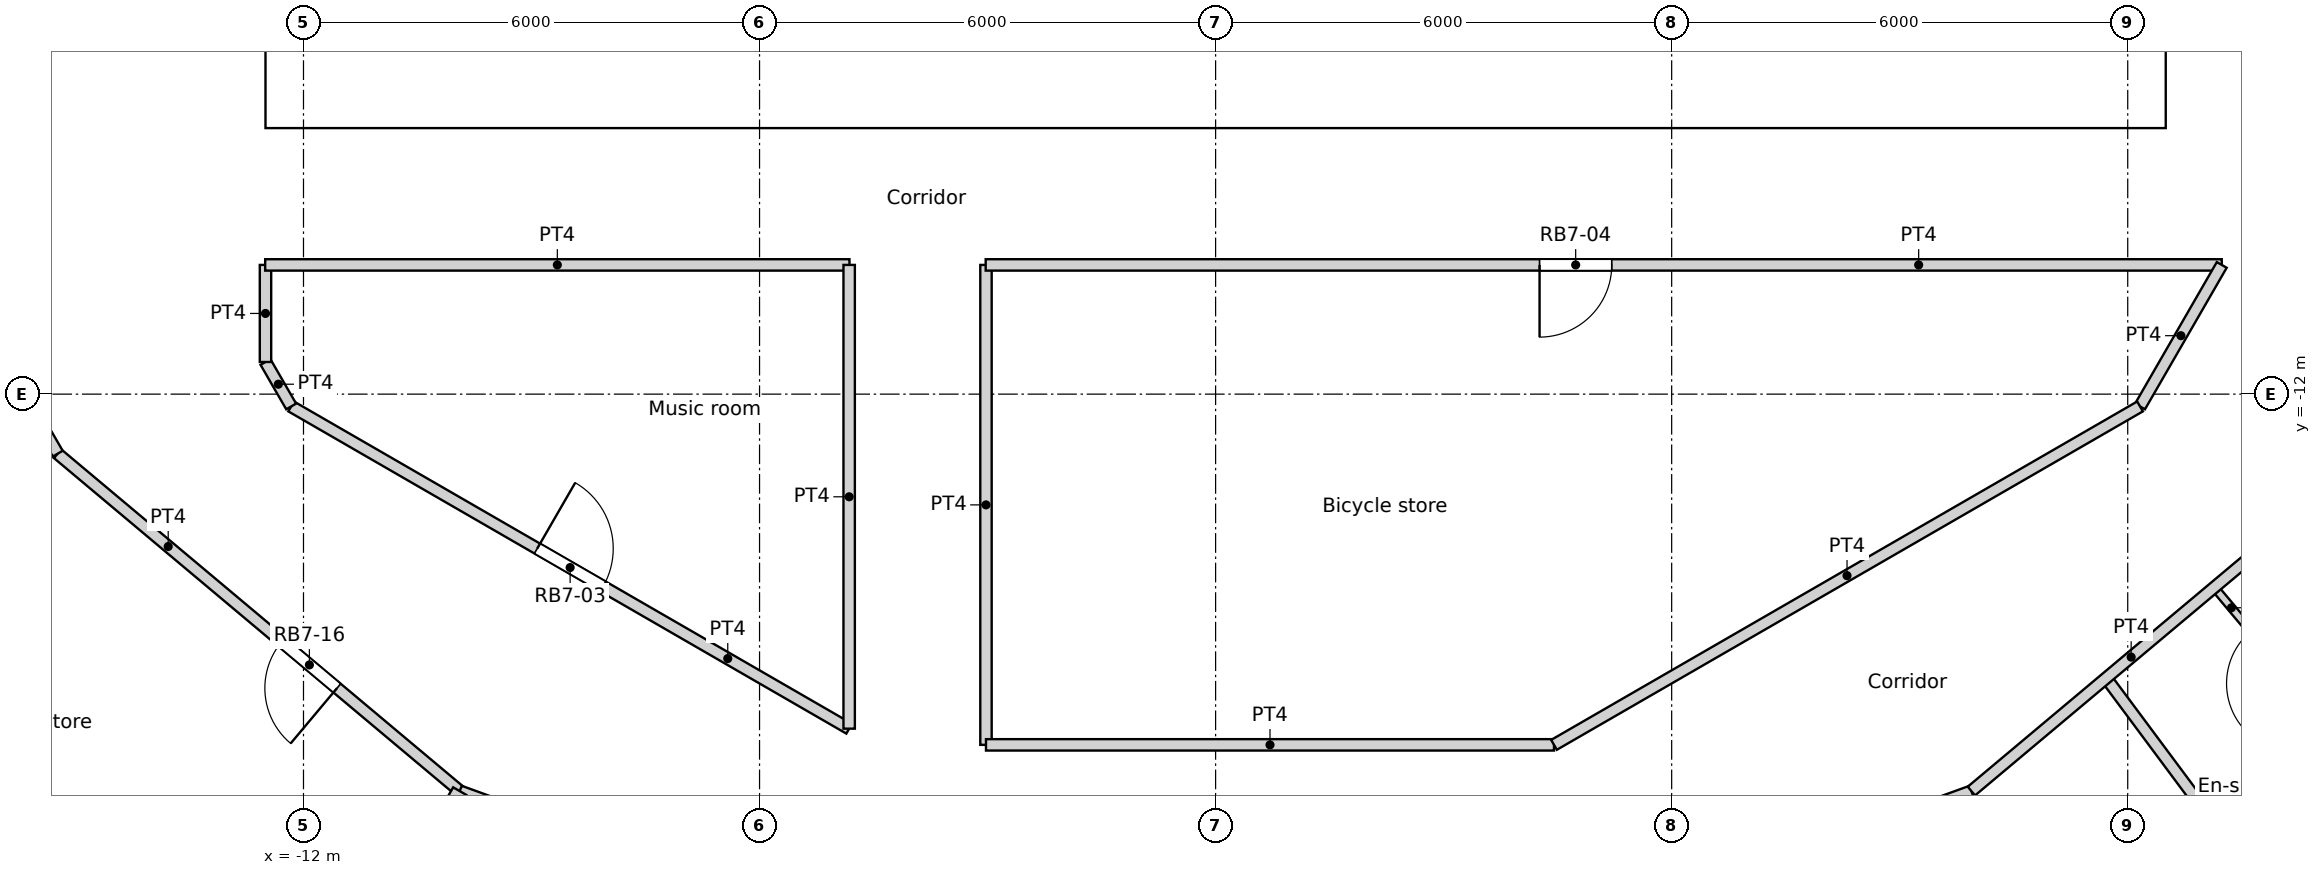
"""IFC4 building model, lengths in metres.
Left out: names, types, materials, properties, quantities, classifications, styles, units other than length and angle.
Written with IfcOpenShell. Run it as: python <this file> out.ifc"""

import sys

from ifc_helpers import new_model, si_unit, direction, frame, frame_2d, origin, origin_2d, place, context, subcontext, project, spatial, rectangle, circle, extrude, element, fill, save


model = new_model("IFC4")
c1 = context("Model", 3, precision=1e-05, world=origin(), true_north=direction((0.0, 1.0)))
c2 = subcontext(c1, "Body", "Model", "MODEL_VIEW")
j1 = project(units=[si_unit("LENGTHUNIT", "METRE"), si_unit("PLANEANGLEUNIT", "RADIAN")], contexts=[c1])
p1 = place(None, origin())
s1 = spatial("IfcSite", under=j1, at=p1, CompositionType="ELEMENT")
p2 = place(p1, origin())
s2 = spatial("IfcBuilding", under=s1, at=p2, CompositionType="ELEMENT")
p3 = place(p2, frame((0.0, 0.0, 190.8)))
s3 = spatial("IfcBuildingStorey", under=s2, at=p3, CompositionType="ELEMENT", Elevation=190.8)
for number, where, z_axis, x_axis in (
    (1, (-13.798, -12.802, 0.0), (0.0, 0.0, 1.0), (1.0, 0.0, 0.0)),
    (2, (-9.411, -16.301, 0.0), (0.0, 0.0, 1.0), (1.0, 0.0, 0.0)),
    (3, (6.876, -17.521, 0.0), (0.0, 0.0, 1.0), (1.0, 0.0, 0.0)),
    (4, (11.735, -14.716, 0.0), (0.0, 0.0, 1.0), (1.0, 0.0, 0.0)),
):
    element("IfcColumn", number, at=place(p3, frame(where, z_axis=z_axis, x_axis=x_axis)), inside=s3, PredefinedType="COLUMN", context=c2, shape_type="SweptSolid", body=[
        extrude(circle(Radius=0.65, at=origin_2d()), origin(), (0.0, 0.0, 1.0), 3.6),
    ])
p4 = place(p3, frame((-12.5, -8.05, 0.0), z_axis=(0.0, 0.0, 1.0), x_axis=(1.0, 0.0, 0.0)))
e5 = element("IfcWall", 5, at=p4, inside=s3, PredefinedType="SOLIDWALL", context=c2, shape_type="SweptSolid", body=[
    extrude(rectangle(XDim=25.0, YDim=0.9, at=frame_2d((12.5, 0.0))), origin(), (0.0, 0.0, 1.0), 3.6),
])
p5 = place(p4, frame((13.4, 0.0, 0.0)))
e6 = element("IfcOpeningElement", 6, at=p5, cuts=e5, PredefinedType="OPENING", context=c2, shape_type="SweptSolid", body=[
    extrude(rectangle(XDim=1.0, YDim=2.1, at=frame_2d((0.5, 1.05))), frame((0.0, 0.45, 0.0), z_axis=(0.0, -1.0, 0.0), x_axis=(1.0, 0.0, 0.0)), (0.0, 0.0, 1.0), 0.9),
])
p6 = place(p4, frame((8.3, 0.0, 0.0)))
e7 = element("IfcOpeningElement", 7, at=p6, cuts=e5, PredefinedType="OPENING", context=c2, shape_type="SweptSolid", body=[
    extrude(rectangle(XDim=1.8, YDim=2.1, at=frame_2d((0.9, 1.05))), frame((0.0, 0.45, 0.0), z_axis=(0.0, -1.0, 0.0), x_axis=(1.0, 0.0, 0.0)), (0.0, 0.0, 1.0), 0.9),
])
p7 = place(p4, frame((14.9, 0.0, 0.0)))
e8 = element("IfcOpeningElement", 8, at=p7, cuts=e5, PredefinedType="OPENING", context=c2, shape_type="SweptSolid", body=[
    extrude(rectangle(XDim=1.8, YDim=2.1, at=frame_2d((0.9, 1.05))), frame((0.0, 0.45, 0.0), z_axis=(0.0, -1.0, 0.0), x_axis=(1.0, 0.0, 0.0)), (0.0, 0.0, 1.0), 0.9),
])
p8 = place(p3, frame((-12.05, -7.6, 0.0), z_axis=(0.0, 0.0, 1.0), x_axis=(0.0, 1.0, 0.0)))
e9 = element("IfcWall", 9, at=p8, inside=s3, PredefinedType="SOLIDWALL", context=c2, shape_type="SweptSolid", body=[
    extrude(rectangle(XDim=15.2, YDim=0.9, at=frame_2d((7.6, 0.0))), origin(), (0.0, 0.0, 1.0), 3.6),
])
p9 = place(p8, frame((7.1, 0.0, 0.0)))
e10 = element("IfcOpeningElement", 10, at=p9, cuts=e9, PredefinedType="OPENING", context=c2, shape_type="SweptSolid", body=[
    extrude(rectangle(XDim=1.0, YDim=2.1, at=frame_2d((0.5, 1.05))), frame((0.0, 0.45, 0.0), z_axis=(0.0, -1.0, 0.0), x_axis=(1.0, 0.0, 0.0)), (0.0, 0.0, 1.0), 0.9),
])
p10 = place(p3, frame((12.05, -7.6, 0.0), z_axis=(0.0, 0.0, 1.0), x_axis=(0.0, 1.0, 0.0)))
e11 = element("IfcWall", 11, at=p10, inside=s3, PredefinedType="SOLIDWALL", context=c2, shape_type="SweptSolid", body=[
    extrude(rectangle(XDim=15.2, YDim=0.9, at=frame_2d((7.6, 0.0))), origin(), (0.0, 0.0, 1.0), 3.6),
])
p11 = place(p10, frame((5.1, 0.0, 0.0)))
e12 = element("IfcOpeningElement", 12, at=p11, cuts=e11, PredefinedType="OPENING", context=c2, shape_type="SweptSolid", body=[
    extrude(rectangle(XDim=1.0, YDim=2.1, at=frame_2d((0.5, 1.05))), frame((0.0, 0.45, 0.0), z_axis=(0.0, -1.0, 0.0), x_axis=(1.0, 0.0, 0.0)), (0.0, 0.0, 1.0), 0.9),
])
for number, where, z_axis, x_axis in (
    (13, (0.55, -7.6, 0.0), (0.0, 0.0, 1.0), (0.0, 1.0, 0.0)),
    (14, (2.25, -7.6, 0.0), (0.0, 0.0, 1.0), (0.0, 1.0, 0.0)),
):
    element("IfcWall", number, at=place(p3, frame(where, z_axis=z_axis, x_axis=x_axis)), inside=s3, PredefinedType="SOLIDWALL", context=c2, shape_type="SweptSolid", body=[
        extrude(rectangle(XDim=4.35, YDim=0.3, at=frame_2d((2.175, 0.0))), origin(), (0.0, 0.0, 1.0), 3.3),
    ])
p12 = place(p3, frame((-9.05, -7.15, 0.0), z_axis=(0.0, 0.0, 1.0), x_axis=(1.0, 0.0, 0.0)))
e15 = element("IfcWall", 15, at=p12, inside=s3, PredefinedType="SOLIDWALL", context=c2, shape_type="SweptSolid", body=[
    extrude(rectangle(XDim=4.85, YDim=0.9, at=frame_2d((2.425, 0.0))), origin(), (0.0, 0.0, 1.0), 3.3),
])
p13 = place(p3, frame((-2.4, -7.15, 0.0), z_axis=(0.0, 0.0, 1.0), x_axis=(1.0, 0.0, 0.0)))
e16 = element("IfcWall", 16, at=p13, inside=s3, PredefinedType="SOLIDWALL", context=c2, shape_type="SweptSolid", body=[
    extrude(rectangle(XDim=2.8, YDim=0.9, at=frame_2d((1.4, 0.0))), origin(), (0.0, 0.0, 1.0), 3.3),
])
p14 = place(p3, frame((4.2, -7.15, 0.0), z_axis=(0.0, 0.0, 1.0), x_axis=(1.0, 0.0, 0.0)))
e17 = element("IfcWall", 17, at=p14, inside=s3, PredefinedType="SOLIDWALL", context=c2, shape_type="SweptSolid", body=[
    extrude(rectangle(XDim=4.85, YDim=0.9, at=frame_2d((2.425, 0.0))), origin(), (0.0, 0.0, 1.0), 3.3),
])
p15 = place(p3, frame((-12.504, -10.3, 0.0), z_axis=(0.0, 0.0, 1.0), x_axis=(1.0, 0.0, 0.0)))
e18 = element("IfcWall", 18, at=p15, inside=s3, PredefinedType="PARTITIONING", context=c2, shape_type="SweptSolid", body=[
    extrude(rectangle(XDim=7.687, YDim=0.15, at=frame_2d((3.844, 0.0))), origin(), (0.0, 0.0, 1.0), 3.3),
])
p16 = place(p3, frame((-3.025, -10.3, 0.0), z_axis=(0.0, 0.0, 1.0), x_axis=(1.0, 0.0, 0.0)))
e19 = element("IfcWall", 19, at=p16, inside=s3, PredefinedType="PARTITIONING", context=c2, shape_type="SweptSolid", body=[
    extrude(rectangle(XDim=16.262, YDim=0.15, at=frame_2d((8.131, 0.0))), origin(), (0.0, 0.0, 1.0), 3.3),
])
p17 = place(p16, frame((7.287, 0.0, 0.0)))
e20 = element("IfcOpeningElement", 20, at=p17, cuts=e19, PredefinedType="OPENING", context=c2, shape_type="SweptSolid", body=[
    extrude(rectangle(XDim=0.95, YDim=2.1, at=frame_2d((0.475, 1.05))), frame((0.0, 0.075, 0.0), z_axis=(0.0, -1.0, 0.0), x_axis=(1.0, 0.0, 0.0)), (0.0, 0.0, 1.0), 0.15),
])
p18 = place(p3, frame((12.162, -12.162, 0.0), z_axis=(0.0, 0.0, 1.0), x_axis=(0.499961633463, 0.866047553582, 0.0)))
e21 = element("IfcWall", 21, at=p18, inside=s3, PredefinedType="PARTITIONING", context=c2, shape_type="SweptSolid", body=[
    extrude(rectangle(XDim=2.15, YDim=0.15, at=frame_2d((1.075, 0.0))), origin(), (0.0, 0.0, 1.0), 3.3),
])
p19 = place(p3, frame((9.943, -17.222, 0.0), z_axis=(0.0, 0.0, 1.0), x_axis=(0.766192104565, 0.642611592567, 0.0)))
e22 = element("IfcWall", 22, at=p19, inside=s3, PredefinedType="PARTITIONING", context=c2, shape_type="SweptSolid", body=[
    extrude(rectangle(XDim=6.906, YDim=0.15, at=frame_2d((3.453, 0.0))), origin(), (0.0, 0.0, 1.0), 3.3),
])
p20 = place(p19, frame((5.537, 0.0, 0.0)))
e23 = element("IfcOpeningElement", 23, at=p20, cuts=e22, PredefinedType="OPENING", context=c2, shape_type="SweptSolid", body=[
    extrude(rectangle(XDim=1.0, YDim=2.1, at=frame_2d((0.5, 1.05))), frame((0.0, 0.075, 0.0), z_axis=(0.0, -1.0, 0.0), x_axis=(1.0, 0.0, 0.0)), (0.0, 0.0, 1.0), 0.15),
])
p21 = place(p3, frame((-12.5, -11.577, 0.0), z_axis=(0.0, 0.0, 1.0), x_axis=(0.0, 1.0, 0.0)))
e24 = element("IfcWall", 24, at=p21, inside=s3, PredefinedType="PARTITIONING", context=c2, shape_type="SweptSolid", body=[
    extrude(rectangle(XDim=1.277, YDim=0.15, at=frame_2d((0.638, 0.0))), origin(), (0.0, 0.0, 1.0), 3.3),
])
p22 = place(p3, frame((-12.5, -11.577, 0.0), z_axis=(0.0, 0.0, 1.0), x_axis=(0.500024767483, -0.866011103799, 0.0)))
e25 = element("IfcWall", 25, at=p22, inside=s3, PredefinedType="PARTITIONING", context=c2, shape_type="SweptSolid", body=[
    extrude(rectangle(XDim=0.676, YDim=0.15, at=frame_2d((0.338, 0.0))), origin(), (0.0, 0.0, 1.0), 3.3),
])
p23 = place(p3, frame((-18.688, -6.802, 0.0), z_axis=(0.0, 0.0, 1.0), x_axis=(0.500229307554, -0.865892972523, 0.0)))
e26 = element("IfcWall", 26, at=p23, inside=s3, PredefinedType="PARTITIONING", context=c2, shape_type="SweptSolid", body=[
    extrude(rectangle(XDim=6.907, YDim=0.15, at=frame_2d((3.454, 0.0))), origin(), (0.0, 0.0, 1.0), 3.3),
])
p24 = place(p3, frame((-15.235, -12.784, 0.0), z_axis=(0.0, 0.0, 1.0), x_axis=(0.766192104565, -0.642611592567, 0.0)))
e27 = element("IfcWall", 27, at=p24, inside=s3, PredefinedType="PARTITIONING", context=c2, shape_type="SweptSolid", body=[
    extrude(rectangle(XDim=6.906, YDim=0.15, at=frame_2d((3.453, 0.0))), origin(), (0.0, 0.0, 1.0), 3.3),
])
p25 = place(p24, frame((3.848, 0.0, 0.0)))
e28 = element("IfcOpeningElement", 28, at=p25, cuts=e27, PredefinedType="OPENING", context=c2, shape_type="SweptSolid", body=[
    extrude(rectangle(XDim=0.95, YDim=2.1, at=frame_2d((0.475, 1.05))), frame((0.0, 0.075, 0.0), z_axis=(0.0, -1.0, 0.0), x_axis=(1.0, 0.0, 0.0)), (0.0, 0.0, 1.0), 0.15),
])
p26 = place(p3, frame((-12.162, -12.162, 0.0), z_axis=(0.0, 0.0, 1.0), x_axis=(0.866004766557, -0.500035743023, 0.0)))
e29 = element("IfcWall", 29, at=p26, inside=s3, PredefinedType="PARTITIONING", context=c2, shape_type="SweptSolid", body=[
    extrude(rectangle(XDim=8.477, YDim=0.15, at=frame_2d((4.239, 0.0))), origin(), (0.0, 0.0, 1.0), 3.3),
])
p27 = place(p26, frame((3.738, 0.0, 0.0)))
e30 = element("IfcOpeningElement", 30, at=p27, cuts=e29, PredefinedType="OPENING", context=c2, shape_type="SweptSolid", body=[
    extrude(rectangle(XDim=1.0, YDim=2.04, at=frame_2d((0.5, 1.02))), frame((0.0, 0.075, 0.0), z_axis=(0.0, -1.0, 0.0), x_axis=(1.0, 0.0, 0.0)), (0.0, 0.0, 1.0), 0.15),
])
p28 = place(p3, frame((-4.821, -16.401, 0.0), z_axis=(0.0, 0.0, 1.0), x_axis=(0.0, 1.0, 0.0)))
e31 = element("IfcWall", 31, at=p28, inside=s3, PredefinedType="PARTITIONING", context=c2, shape_type="SweptSolid", body=[
    extrude(rectangle(XDim=6.101, YDim=0.15, at=frame_2d((3.05, 0.0))), origin(), (0.0, 0.0, 1.0), 3.3),
])
p29 = place(p3, frame((-3.021, -16.614, 0.0), z_axis=(0.0, 0.0, 1.0), x_axis=(0.0, 1.0, 0.0)))
e32 = element("IfcWall", 32, at=p29, inside=s3, PredefinedType="PARTITIONING", context=c2, shape_type="SweptSolid", body=[
    extrude(rectangle(XDim=6.314, YDim=0.15, at=frame_2d((3.157, 0.0))), origin(), (0.0, 0.0, 1.0), 3.3),
])
p30 = place(p3, frame((-3.021, -16.614, 0.0), z_axis=(0.0, 0.0, 1.0), x_axis=(1.0, 0.0, 0.0)))
e33 = element("IfcWall", 33, at=p30, inside=s3, PredefinedType="PARTITIONING", context=c2, shape_type="SweptSolid", body=[
    extrude(rectangle(XDim=7.473, YDim=0.15, at=frame_2d((3.736, 0.0))), origin(), (0.0, 0.0, 1.0), 3.3),
])
p31 = place(p3, frame((4.452, -16.614, 0.0), z_axis=(0.0, 0.0, 1.0), x_axis=(0.866005203721, 0.500034985904, 0.0)))
e34 = element("IfcWall", 34, at=p31, inside=s3, PredefinedType="PARTITIONING", context=c2, shape_type="SweptSolid", body=[
    extrude(rectangle(XDim=8.903, YDim=0.15, at=frame_2d((4.452, 0.0))), origin(), (0.0, 0.0, 1.0), 3.3),
])
p32 = place(p3, frame((-9.944, -17.223, 0.0), z_axis=(0.0, 0.0, 1.0), x_axis=(0.939672634566, -0.342075050021, 0.0)))
e35 = element("IfcWall", 35, at=p32, inside=s3, PredefinedType="PARTITIONING", context=c2, shape_type="SweptSolid", body=[
    extrude(rectangle(XDim=6.908, YDim=0.15, at=frame_2d((3.454, 0.0))), origin(), (0.0, 0.0, 1.0), 3.3),
])
p33 = place(p32, frame((2.704, 0.0, 0.0)))
e36 = element("IfcOpeningElement", 36, at=p33, cuts=e35, PredefinedType="OPENING", context=c2, shape_type="SweptSolid", body=[
    extrude(rectangle(XDim=1.5, YDim=2.1, at=frame_2d((0.75, 1.05))), frame((0.0, 0.075, 0.0), z_axis=(0.0, -1.0, 0.0), x_axis=(1.0, 0.0, 0.0)), (0.0, 0.0, 1.0), 0.15),
])
p34 = place(p3, frame((3.453, -19.586, 0.0), z_axis=(0.0, 0.0, 1.0), x_axis=(0.939672634566, 0.342075050021, 0.0)))
e37 = element("IfcWall", 37, at=p34, inside=s3, PredefinedType="PARTITIONING", context=c2, shape_type="SweptSolid", body=[
    extrude(rectangle(XDim=6.908, YDim=0.15, at=frame_2d((3.454, 0.0))), origin(), (0.0, 0.0, 1.0), 3.3),
])
p35 = place(p34, frame((1.904, 0.0, 0.0)))
e38 = element("IfcOpeningElement", 38, at=p35, cuts=e37, PredefinedType="OPENING", context=c2, shape_type="SweptSolid", body=[
    extrude(rectangle(XDim=1.0, YDim=2.04, at=frame_2d((0.5, 1.02))), frame((0.0, 0.075, 0.0), z_axis=(0.0, -1.0, 0.0), x_axis=(1.0, 0.0, 0.0)), (0.0, 0.0, 1.0), 0.15),
])
p36 = place(p3, frame((-12.749, -22.081, 0.0), z_axis=(0.0, 0.0, 1.0), x_axis=(0.500010020406, 0.866019618423, 0.0)))
e39 = element("IfcWall", 39, at=p36, inside=s3, PredefinedType="PARTITIONING", context=c2, shape_type="SweptSolid", body=[
    extrude(rectangle(XDim=5.61, YDim=0.2, at=frame_2d((2.805, 0.0))), origin(), (0.0, 0.0, 1.0), 3.3),
])
p37 = place(p3, frame((11.717, -15.736, 0.0), z_axis=(0.0, 0.0, 1.0), x_axis=(0.597012012598, -0.802232296043, 0.0)))
e40 = element("IfcWall", 40, at=p37, inside=s3, PredefinedType="PARTITIONING", context=c2, shape_type="SweptSolid", body=[
    extrude(rectangle(XDim=5.878, YDim=0.15, at=frame_2d((2.939, 0.0))), origin(), (0.0, 0.0, 1.0), 3.3),
])
p38 = place(p3, frame((13.151, -17.665, 0.0), z_axis=(0.0, 0.0, 1.0), x_axis=(0.766224532916, 0.642572925945, 0.0)))
e41 = element("IfcWall", 41, at=p38, inside=s3, PredefinedType="PARTITIONING", context=c2, shape_type="SweptSolid", body=[
    extrude(rectangle(XDim=1.998, YDim=0.1, at=frame_2d((0.999, 0.0))), origin(), (0.0, 0.0, 1.0), 3.3),
])
p39 = place(p3, frame((13.139, -14.542, 0.0), z_axis=(0.0, 0.0, 1.0), x_axis=(0.642731657745, -0.766091388891, 0.0)))
e42 = element("IfcWall", 42, at=p39, inside=s3, PredefinedType="PARTITIONING", context=c2, shape_type="SweptSolid", body=[
    extrude(rectangle(XDim=2.401, YDim=0.1, at=frame_2d((1.2, 0.0))), origin(), (0.0, 0.0, 1.0), 3.3),
])
p40 = place(p39, frame((0.75, 0.0, 0.0)))
e43 = element("IfcOpeningElement", 43, at=p40, cuts=e42, PredefinedType="OPENING", context=c2, shape_type="SweptSolid", body=[
    extrude(rectangle(XDim=0.9, YDim=2.04, at=frame_2d((0.45, 1.02))), frame((0.0, 0.05, 0.0), z_axis=(0.0, -1.0, 0.0), x_axis=(1.0, 0.0, 0.0)), (0.0, 0.0, 1.0), 0.1),
])
p41 = place(p5, origin())
e44 = element("IfcDoor", 44, at=p41, inside=s3, OperationType="SINGLE_SWING_LEFT", PredefinedType="DOOR", context=c2, shape_type="SweptSolid", body=[
    extrude(rectangle(XDim=1.0, YDim=2.1, at=frame_2d((0.5, 1.05))), frame((0.0, 0.025, 0.0), z_axis=(0.0, -1.0, 0.0), x_axis=(1.0, 0.0, 0.0)), (0.0, 0.0, 1.0), 0.05),
])
fill(e6, e44)
p42 = place(p6, origin())
e45 = element("IfcDoor", 45, at=p42, inside=s3, OperationType="DOUBLE_DOOR_SINGLE_SWING", PredefinedType="DOOR", context=c2, shape_type="SweptSolid", body=[
    extrude(rectangle(XDim=1.8, YDim=2.1, at=frame_2d((0.9, 1.05))), frame((0.0, 0.025, 0.0), z_axis=(0.0, -1.0, 0.0), x_axis=(1.0, 0.0, 0.0)), (0.0, 0.0, 1.0), 0.05),
])
fill(e7, e45)
p43 = place(p7, origin())
e46 = element("IfcDoor", 46, at=p43, inside=s3, OperationType="DOUBLE_DOOR_SINGLE_SWING", PredefinedType="DOOR", context=c2, shape_type="SweptSolid", body=[
    extrude(rectangle(XDim=1.8, YDim=2.1, at=frame_2d((0.9, 1.05))), frame((0.0, 0.025, 0.0), z_axis=(0.0, -1.0, 0.0), x_axis=(1.0, 0.0, 0.0)), (0.0, 0.0, 1.0), 0.05),
])
fill(e8, e46)
p44 = place(p27, origin())
e47 = element("IfcDoor", 47, at=p44, inside=s3, OperationType="SINGLE_SWING_LEFT", PredefinedType="DOOR", context=c2, shape_type="SweptSolid", body=[
    extrude(rectangle(XDim=1.0, YDim=2.04, at=frame_2d((0.5, 1.02))), frame((0.0, 0.025, 0.0), z_axis=(0.0, -1.0, 0.0), x_axis=(1.0, 0.0, 0.0)), (0.0, 0.0, 1.0), 0.05),
])
fill(e30, e47)
p45 = place(p17, origin())
e48 = element("IfcDoor", 48, at=p45, inside=s3, OperationType="SINGLE_SWING_RIGHT", PredefinedType="DOOR", context=c2, shape_type="SweptSolid", body=[
    extrude(rectangle(XDim=0.95, YDim=2.1, at=frame_2d((0.475, 1.05))), frame((0.0, 0.025, 0.0), z_axis=(0.0, -1.0, 0.0), x_axis=(1.0, 0.0, 0.0)), (0.0, 0.0, 1.0), 0.05),
])
fill(e20, e48)
p46 = place(p25, origin())
e49 = element("IfcDoor", 49, at=p46, inside=s3, OperationType="SINGLE_SWING_LEFT", PredefinedType="DOOR", context=c2, shape_type="SweptSolid", body=[
    extrude(rectangle(XDim=0.95, YDim=2.1, at=frame_2d((0.475, 1.05))), frame((0.0, 0.025, 0.0), z_axis=(0.0, -1.0, 0.0), x_axis=(1.0, 0.0, 0.0)), (0.0, 0.0, 1.0), 0.05),
])
fill(e28, e49)
save(model, sys.argv[1])
